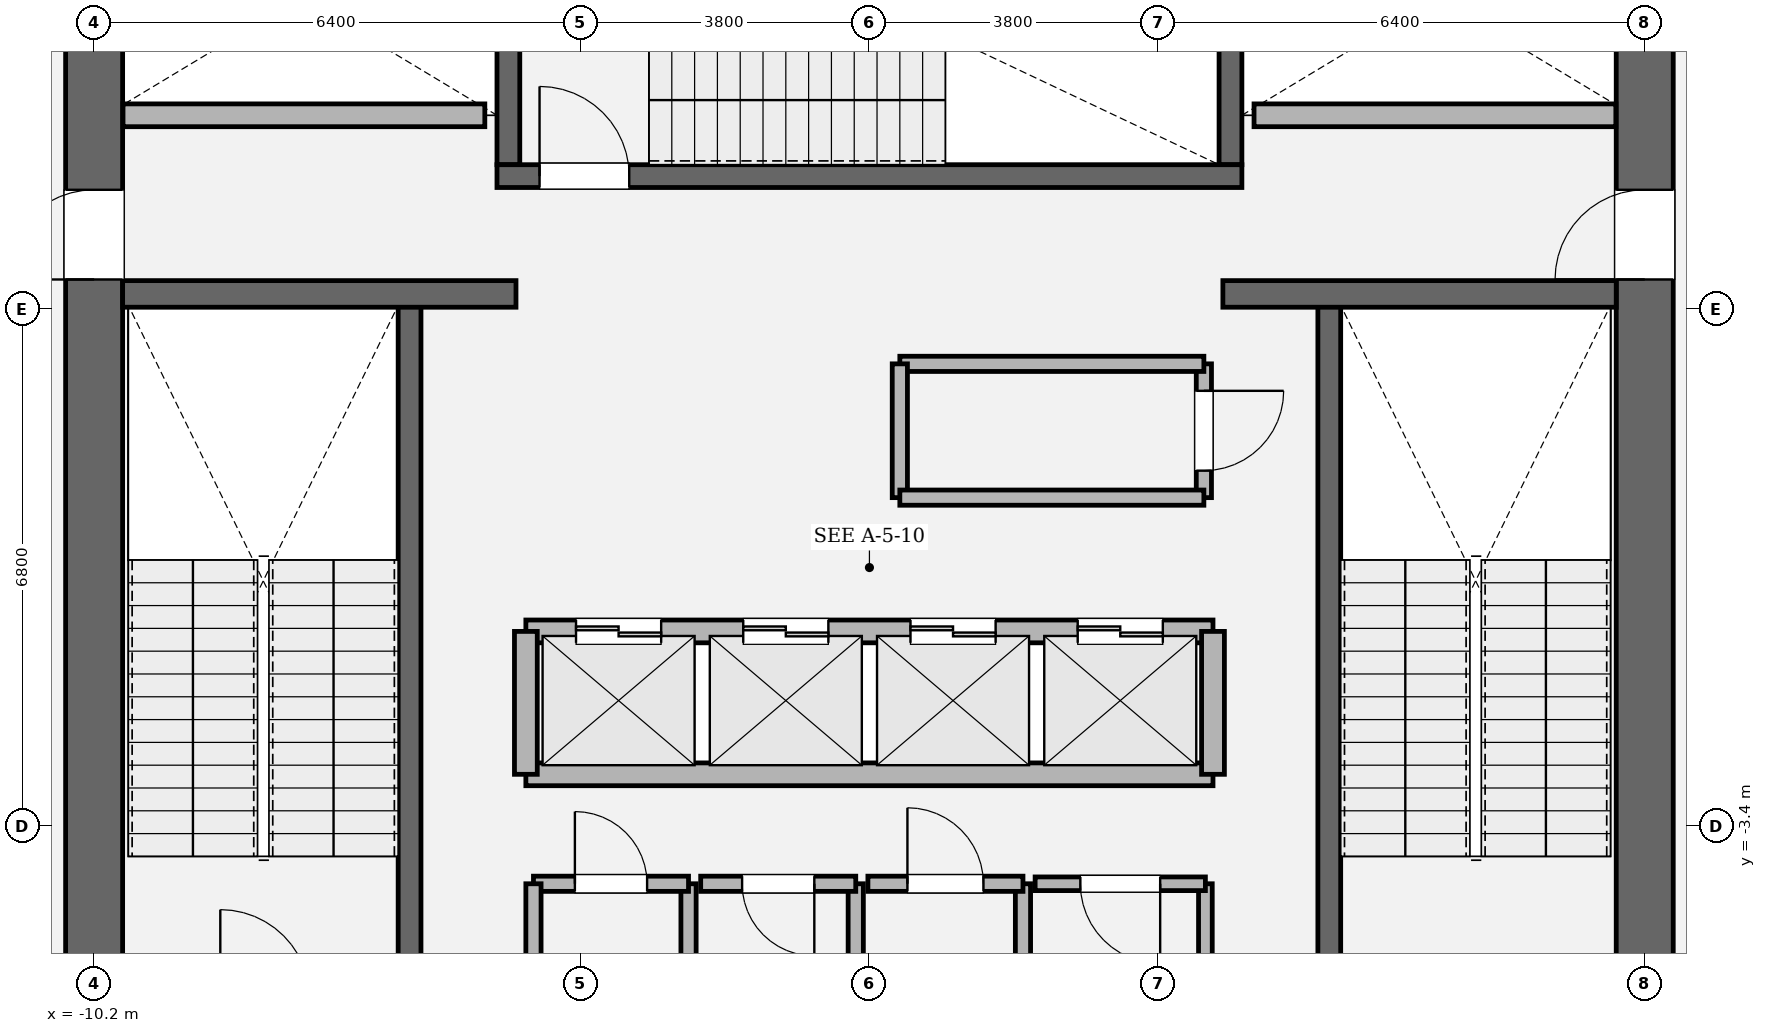
"""IFC4 building model, lengths in metres.
Left out: names, types, materials, properties, quantities, classifications, styles, units other than length and angle.
Written with IfcOpenShell. Run it as: python <this file> out.ifc"""

import sys

from ifc_helpers import new_model, si_unit, direction, frame, frame_2d, origin, place, context, subcontext, project, spatial, rectangle, extrude, element, fill, save


model = new_model("IFC4")
c1 = context("Model", 3, precision=1e-05, world=origin(), true_north=direction((0.0, 1.0)))
c2 = subcontext(c1, "Body", "Model", "MODEL_VIEW")
j1 = project(units=[si_unit("LENGTHUNIT", "METRE"), si_unit("PLANEANGLEUNIT", "RADIAN")], contexts=[c1])
p1 = place(None, origin())
s1 = spatial("IfcSite", under=j1, at=p1, CompositionType="ELEMENT")
p2 = place(p1, origin())
s2 = spatial("IfcBuilding", under=s1, at=p2, CompositionType="ELEMENT")
p3 = place(p2, frame((0.0, 0.0, 44.4)))
s3 = spatial("IfcBuildingStorey", under=s2, at=p3, CompositionType="ELEMENT", Elevation=44.4)
p4 = place(p3, frame((-10.2, -8.825, 0.0), z_axis=(0.0, 0.0, 1.0), x_axis=(0.0, 1.0, 0.0)))
e1 = element("IfcWall", 1, at=p4, inside=s3, PredefinedType="SHEAR", context=c2, shape_type="SweptSolid", body=[
    extrude(rectangle(XDim=17.65, YDim=0.75, at=frame_2d((8.825, 0.0))), origin(), (0.0, 0.0, 1.0), 4.05),
])
p5 = place(p4, frame((12.615, 0.0, 0.0)))
e2 = element("IfcOpeningElement", 2, at=p5, cuts=e1, PredefinedType="OPENING", context=c2, shape_type="SweptSolid", body=[
    extrude(rectangle(XDim=1.18, YDim=2.2, at=frame_2d((0.59, 1.1))), frame((0.0, 0.385, 0.0), z_axis=(0.0, -1.0, 0.0), x_axis=(1.0, 0.0, 0.0)), (0.0, 0.0, 1.0), 0.77),
])
p6 = place(p3, frame((10.2, 8.825, 0.0), z_axis=(0.0, 0.0, 1.0), x_axis=(0.0, -1.0, 0.0)))
e3 = element("IfcWall", 3, at=p6, inside=s3, PredefinedType="SHEAR", context=c2, shape_type="SweptSolid", body=[
    extrude(rectangle(XDim=17.65, YDim=0.75, at=frame_2d((8.825, 0.0))), origin(), (0.0, 0.0, 1.0), 4.05),
])
p7 = place(p6, frame((3.855, 0.0, 0.0)))
e4 = element("IfcOpeningElement", 4, at=p7, cuts=e3, PredefinedType="OPENING", context=c2, shape_type="SweptSolid", body=[
    extrude(rectangle(XDim=1.18, YDim=2.2, at=frame_2d((0.59, 1.1))), frame((0.0, 0.385, 0.0), z_axis=(0.0, -1.0, 0.0), x_axis=(1.0, 0.0, 0.0)), (0.0, 0.0, 1.0), 0.77),
])
for number, where, z_axis, x_axis in (
    (5, (-6.05, -5.5, 0.0), (0.0, 0.0, 1.0), (0.0, 1.0, 0.0)),
    (6, (6.05, 3.45, 0.0), (0.0, 0.0, 1.0), (0.0, -1.0, 0.0)),
):
    element("IfcWall", number, at=place(p3, frame(where, z_axis=z_axis, x_axis=x_axis)), inside=s3, PredefinedType="SOLIDWALL", context=c2, shape_type="SweptSolid", body=[
        extrude(rectangle(XDim=8.95, YDim=0.3, at=frame_2d((4.475, 0.0))), origin(), (0.0, 0.0, 1.0), 4.05),
    ])
for number, where, z_axis, x_axis in (
    (7, (-4.75, 5.3, 0.0), (0.0, 0.0, 1.0), (0.0, 1.0, 0.0)),
    (8, (4.75, 8.825, 0.0), (0.0, 0.0, 1.0), (0.0, -1.0, 0.0)),
):
    element("IfcWall", number, at=place(p3, frame(where, z_axis=z_axis, x_axis=x_axis)), inside=s3, PredefinedType="SOLIDWALL", context=c2, shape_type="SweptSolid", body=[
        extrude(rectangle(XDim=3.525, YDim=0.3, at=frame_2d((1.762, 0.0))), origin(), (0.0, 0.0, 1.0), 4.05),
    ])
p8 = place(p3, frame((-4.9, 5.15, 0.0), z_axis=(0.0, 0.0, 1.0), x_axis=(1.0, 0.0, 0.0)))
e9 = element("IfcWall", 9, at=p8, inside=s3, PredefinedType="SOLIDWALL", context=c2, shape_type="SweptSolid", body=[
    extrude(rectangle(XDim=9.8, YDim=0.3, at=frame_2d((4.9, 0.0))), origin(), (0.0, 0.0, 1.0), 4.05),
])
p9 = place(p8, frame((0.56, 0.0, 0.0)))
e10 = element("IfcOpeningElement", 10, at=p9, cuts=e9, PredefinedType="OPENING", context=c2, shape_type="SweptSolid", body=[
    extrude(rectangle(XDim=1.18, YDim=2.2, at=frame_2d((0.59, 1.1))), frame((0.0, 0.16, 0.0), z_axis=(0.0, -1.0, 0.0), x_axis=(1.0, 0.0, 0.0)), (0.0, 0.0, 1.0), 0.32),
])
for number, where, z_axis, x_axis in (
    (11, (-9.825, 3.6, 0.0), (0.0, 0.0, 1.0), (1.0, 0.0, 0.0)),
    (12, (4.65, 3.6, 0.0), (0.0, 0.0, 1.0), (1.0, 0.0, 0.0)),
):
    element("IfcWall", number, at=place(p3, frame(where, z_axis=z_axis, x_axis=x_axis)), inside=s3, PredefinedType="SOLIDWALL", context=c2, shape_type="SweptSolid", body=[
        extrude(rectangle(XDim=5.175, YDim=0.35, at=frame_2d((2.587, 0.0))), origin(), (0.0, 0.0, 1.0), 4.05),
    ])
p10 = place(p3, frame((-4.52, -0.84, 0.0), z_axis=(0.0, 0.0, 1.0), x_axis=(1.0, 0.0, 0.0)))
e13 = element("IfcWall", 13, at=p10, inside=s3, PredefinedType="SOLIDWALL", context=c2, shape_type="SweptSolid", body=[
    extrude(rectangle(XDim=9.04, YDim=0.3, at=frame_2d((4.52, 0.0))), origin(), (0.0, 0.0, 1.0), 3.81),
])
p11 = place(p10, frame((0.66, 0.0, 0.0)))
e14 = element("IfcOpeningElement", 14, at=p11, cuts=e13, PredefinedType="OPENING", context=c2, shape_type="SweptSolid", body=[
    extrude(rectangle(XDim=1.12, YDim=2.25, at=frame_2d((0.56, 1.125))), frame((0.0, 0.16, 0.0), z_axis=(0.0, -1.0, 0.0), x_axis=(1.0, 0.0, 0.0)), (0.0, 0.0, 1.0), 0.32),
])
p12 = place(p10, frame((2.86, 0.0, 0.0)))
e15 = element("IfcOpeningElement", 15, at=p12, cuts=e13, PredefinedType="OPENING", context=c2, shape_type="SweptSolid", body=[
    extrude(rectangle(XDim=1.12, YDim=2.25, at=frame_2d((0.56, 1.125))), frame((0.0, 0.16, 0.0), z_axis=(0.0, -1.0, 0.0), x_axis=(1.0, 0.0, 0.0)), (0.0, 0.0, 1.0), 0.32),
])
p13 = place(p10, frame((5.06, 0.0, 0.0)))
e16 = element("IfcOpeningElement", 16, at=p13, cuts=e13, PredefinedType="OPENING", context=c2, shape_type="SweptSolid", body=[
    extrude(rectangle(XDim=1.12, YDim=2.25, at=frame_2d((0.56, 1.125))), frame((0.0, 0.16, 0.0), z_axis=(0.0, -1.0, 0.0), x_axis=(1.0, 0.0, 0.0)), (0.0, 0.0, 1.0), 0.32),
])
p14 = place(p10, frame((7.26, 0.0, 0.0)))
e17 = element("IfcOpeningElement", 17, at=p14, cuts=e13, PredefinedType="OPENING", context=c2, shape_type="SweptSolid", body=[
    extrude(rectangle(XDim=1.12, YDim=2.25, at=frame_2d((0.56, 1.125))), frame((0.0, 0.16, 0.0), z_axis=(0.0, -1.0, 0.0), x_axis=(1.0, 0.0, 0.0)), (0.0, 0.0, 1.0), 0.32),
])
p15 = place(p3, frame((-4.52, -2.72, 0.0), z_axis=(0.0, 0.0, 1.0), x_axis=(1.0, 0.0, 0.0)))
e18 = element("IfcWall", 18, at=p15, inside=s3, PredefinedType="SOLIDWALL", context=c2, shape_type="SweptSolid", body=[
    extrude(rectangle(XDim=9.04, YDim=0.3, at=frame_2d((4.52, 0.0))), origin(), (0.0, 0.0, 1.0), 3.81),
])
for number, where, z_axis, x_axis in (
    (19, (-4.52, -2.72, 0.0), (0.0, 0.0, 1.0), (0.0, 1.0, 0.0)),
    (20, (4.52, -2.72, 0.0), (0.0, 0.0, 1.0), (0.0, 1.0, 0.0)),
):
    element("IfcWall", number, at=place(p3, frame(where, z_axis=z_axis, x_axis=x_axis)), inside=s3, PredefinedType="SOLIDWALL", context=c2, shape_type="SweptSolid", body=[
        extrude(rectangle(XDim=1.88, YDim=0.3, at=frame_2d((0.94, 0.0))), origin(), (0.0, 0.0, 1.0), 3.81),
    ])
for number, where, z_axis, x_axis in (
    (21, (-9.82, 5.95, 0.0), (0.0, 0.0, 1.0), (1.0, 0.0, 0.0)),
    (22, (5.06, 5.95, 0.0), (0.0, 0.0, 1.0), (1.0, 0.0, 0.0)),
):
    element("IfcWall", number, at=place(p3, frame(where, z_axis=z_axis, x_axis=x_axis)), inside=s3, PredefinedType="SOLIDWALL", context=c2, shape_type="SweptSolid", body=[
        extrude(rectangle(XDim=4.76, YDim=0.3, at=frame_2d((2.38, 0.0))), origin(), (0.0, 0.0, 1.0), 3.81),
    ])
p16 = place(p3, frame((-2.38, -5.9, 0.0), z_axis=(0.0, 0.0, 1.0), x_axis=(0.0, 1.0, 0.0)))
e23 = element("IfcWall", 23, at=p16, inside=s3, PredefinedType="SOLIDWALL", context=c2, shape_type="SweptSolid", body=[
    extrude(rectangle(XDim=1.74, YDim=0.2, at=frame_2d((0.87, 0.0))), origin(), (0.0, 0.0, 1.0), 3.81),
])
p17 = place(p3, frame((-2.38, -4.16, 0.0), z_axis=(0.0, 0.0, 1.0), x_axis=(-1.0, 0.0, 0.0)))
e24 = element("IfcWall", 24, at=p17, inside=s3, PredefinedType="SOLIDWALL", context=c2, shape_type="SweptSolid", body=[
    extrude(rectangle(XDim=2.04, YDim=0.2, at=frame_2d((1.02, 0.0))), origin(), (0.0, 0.0, 1.0), 3.81),
])
p18 = place(p17, frame((0.545, 0.0, 0.0)))
e25 = element("IfcOpeningElement", 25, at=p18, cuts=e24, PredefinedType="OPENING", context=c2, shape_type="SweptSolid", body=[
    extrude(rectangle(XDim=0.95, YDim=2.15, at=frame_2d((0.475, 1.075))), frame((0.0, 0.11, 0.0), z_axis=(0.0, -1.0, 0.0), x_axis=(1.0, 0.0, 0.0)), (0.0, 0.0, 1.0), 0.22),
])
for number, where, z_axis, x_axis in (
    (26, (-4.42, -4.16, 0.0), (0.0, 0.0, 1.0), (0.0, -1.0, 0.0)),
    (27, (-0.18, -5.9, 0.0), (0.0, 0.0, 1.0), (0.0, 1.0, 0.0)),
):
    element("IfcWall", number, at=place(p3, frame(where, z_axis=z_axis, x_axis=x_axis)), inside=s3, PredefinedType="SOLIDWALL", context=c2, shape_type="SweptSolid", body=[
        extrude(rectangle(XDim=1.74, YDim=0.2, at=frame_2d((0.87, 0.0))), origin(), (0.0, 0.0, 1.0), 3.81),
    ])
p19 = place(p3, frame((-0.18, -4.16, 0.0), z_axis=(0.0, 0.0, 1.0), x_axis=(-1.0, 0.0, 0.0)))
e28 = element("IfcWall", 28, at=p19, inside=s3, PredefinedType="SOLIDWALL", context=c2, shape_type="SweptSolid", body=[
    extrude(rectangle(XDim=2.04, YDim=0.2, at=frame_2d((1.02, 0.0))), origin(), (0.0, 0.0, 1.0), 3.81),
])
p20 = place(p19, frame((0.545, 0.0, 0.0)))
e29 = element("IfcOpeningElement", 29, at=p20, cuts=e28, PredefinedType="OPENING", context=c2, shape_type="SweptSolid", body=[
    extrude(rectangle(XDim=0.95, YDim=2.15, at=frame_2d((0.475, 1.075))), frame((0.0, 0.11, 0.0), z_axis=(0.0, -1.0, 0.0), x_axis=(1.0, 0.0, 0.0)), (0.0, 0.0, 1.0), 0.22),
])
p21 = place(p3, frame((2.02, -5.9, 0.0), z_axis=(0.0, 0.0, 1.0), x_axis=(0.0, 1.0, 0.0)))
e30 = element("IfcWall", 30, at=p21, inside=s3, PredefinedType="SOLIDWALL", context=c2, shape_type="SweptSolid", body=[
    extrude(rectangle(XDim=1.74, YDim=0.2, at=frame_2d((0.87, 0.0))), origin(), (0.0, 0.0, 1.0), 3.81),
])
p22 = place(p3, frame((2.02, -4.16, 0.0), z_axis=(0.0, 0.0, 1.0), x_axis=(-1.0, 0.0, 0.0)))
e31 = element("IfcWall", 31, at=p22, inside=s3, PredefinedType="SOLIDWALL", context=c2, shape_type="SweptSolid", body=[
    extrude(rectangle(XDim=2.04, YDim=0.2, at=frame_2d((1.02, 0.0))), origin(), (0.0, 0.0, 1.0), 3.81),
])
p23 = place(p22, frame((0.52, 0.0, 0.0)))
e32 = element("IfcOpeningElement", 32, at=p23, cuts=e31, PredefinedType="OPENING", context=c2, shape_type="SweptSolid", body=[
    extrude(rectangle(XDim=1.0, YDim=2.15, at=frame_2d((0.5, 1.075))), frame((0.0, 0.11, 0.0), z_axis=(0.0, -1.0, 0.0), x_axis=(1.0, 0.0, 0.0)), (0.0, 0.0, 1.0), 0.22),
])
p24 = place(p3, frame((4.42, -5.9, 0.0), z_axis=(0.0, 0.0, 1.0), x_axis=(0.0, 1.0, 0.0)))
e33 = element("IfcWall", 33, at=p24, inside=s3, PredefinedType="PARTITIONING", context=c2, shape_type="SweptSolid", body=[
    extrude(rectangle(XDim=1.74, YDim=0.18, at=frame_2d((0.87, 0.0))), origin(), (0.0, 0.0, 1.0), 3.81),
])
p25 = place(p3, frame((4.42, -4.16, 0.0), z_axis=(0.0, 0.0, 1.0), x_axis=(-1.0, 0.0, 0.0)))
e34 = element("IfcWall", 34, at=p25, inside=s3, PredefinedType="PARTITIONING", context=c2, shape_type="SweptSolid", body=[
    extrude(rectangle(XDim=2.24, YDim=0.18, at=frame_2d((1.12, 0.0))), origin(), (0.0, 0.0, 1.0), 3.81),
])
p26 = place(p25, frame((0.595, 0.0, 0.0)))
e35 = element("IfcOpeningElement", 35, at=p26, cuts=e34, PredefinedType="OPENING", context=c2, shape_type="SweptSolid", body=[
    extrude(rectangle(XDim=1.05, YDim=2.2, at=frame_2d((0.525, 1.1))), frame((0.0, 0.1, 0.0), z_axis=(0.0, -1.0, 0.0), x_axis=(1.0, 0.0, 0.0)), (0.0, 0.0, 1.0), 0.2),
])
p27 = place(p3, frame((4.4, 0.92, 0.0), z_axis=(0.0, 0.0, 1.0), x_axis=(0.0, 1.0, 0.0)))
e36 = element("IfcWall", 36, at=p27, inside=s3, PredefinedType="SOLIDWALL", context=c2, shape_type="SweptSolid", body=[
    extrude(rectangle(XDim=1.76, YDim=0.2, at=frame_2d((0.88, 0.0))), origin(), (0.0, 0.0, 1.0), 3.81),
])
p28 = place(p27, frame((0.355, 0.0, 0.0)))
e37 = element("IfcOpeningElement", 37, at=p28, cuts=e36, PredefinedType="OPENING", context=c2, shape_type="SweptSolid", body=[
    extrude(rectangle(XDim=1.05, YDim=2.2, at=frame_2d((0.525, 1.1))), frame((0.0, 0.11, 0.0), z_axis=(0.0, -1.0, 0.0), x_axis=(1.0, 0.0, 0.0)), (0.0, 0.0, 1.0), 0.22),
])
p29 = place(p3, frame((4.4, 2.68, 0.0), z_axis=(0.0, 0.0, 1.0), x_axis=(-1.0, 0.0, 0.0)))
e38 = element("IfcWall", 38, at=p29, inside=s3, PredefinedType="SOLIDWALL", context=c2, shape_type="SweptSolid", body=[
    extrude(rectangle(XDim=4.0, YDim=0.2, at=frame_2d((2.0, 0.0))), origin(), (0.0, 0.0, 1.0), 3.81),
])
p30 = place(p3, frame((0.4, 2.68, 0.0), z_axis=(0.0, 0.0, 1.0), x_axis=(0.0, -1.0, 0.0)))
e39 = element("IfcWall", 39, at=p30, inside=s3, PredefinedType="SOLIDWALL", context=c2, shape_type="SweptSolid", body=[
    extrude(rectangle(XDim=1.76, YDim=0.2, at=frame_2d((0.88, 0.0))), origin(), (0.0, 0.0, 1.0), 3.81),
])
p31 = place(p3, frame((0.4, 0.92, 0.0), z_axis=(0.0, 0.0, 1.0), x_axis=(1.0, 0.0, 0.0)))
e40 = element("IfcWall", 40, at=p31, inside=s3, PredefinedType="SOLIDWALL", context=c2, shape_type="SweptSolid", body=[
    extrude(rectangle(XDim=4.0, YDim=0.2, at=frame_2d((2.0, 0.0))), origin(), (0.0, 0.0, 1.0), 3.81),
])
p32 = place(p9, origin())
e41 = element("IfcDoor", 41, at=p32, inside=s3, OperationType="SINGLE_SWING_LEFT", PredefinedType="DOOR", context=c2, shape_type="SweptSolid", body=[
    extrude(rectangle(XDim=1.18, YDim=2.2, at=frame_2d((0.59, 1.1))), frame((0.0, 0.025, 0.0), z_axis=(0.0, -1.0, 0.0), x_axis=(1.0, 0.0, 0.0)), (0.0, 0.0, 1.0), 0.05),
])
fill(e10, e41)
p33 = place(p5, origin())
e42 = element("IfcDoor", 42, at=p33, inside=s3, OperationType="SINGLE_SWING_LEFT", PredefinedType="DOOR", context=c2, shape_type="SweptSolid", body=[
    extrude(rectangle(XDim=1.18, YDim=2.2, at=frame_2d((0.59, 1.1))), frame((0.0, 0.025, 0.0), z_axis=(0.0, -1.0, 0.0), x_axis=(1.0, 0.0, 0.0)), (0.0, 0.0, 1.0), 0.05),
])
fill(e2, e42)
p34 = place(p7, origin())
e43 = element("IfcDoor", 43, at=p34, inside=s3, OperationType="SINGLE_SWING_RIGHT", PredefinedType="DOOR", context=c2, shape_type="SweptSolid", body=[
    extrude(rectangle(XDim=1.18, YDim=2.2, at=frame_2d((0.59, 1.1))), frame((0.0, 0.025, 0.0), z_axis=(0.0, -1.0, 0.0), x_axis=(1.0, 0.0, 0.0)), (0.0, 0.0, 1.0), 0.05),
])
fill(e4, e43)
p35 = place(p11, origin())
e44 = element("IfcDoor", 44, at=p35, inside=s3, OperationType="DOUBLE_DOOR_SLIDING", PredefinedType="DOOR", context=c2, shape_type="SweptSolid", body=[
    extrude(rectangle(XDim=1.12, YDim=2.25, at=frame_2d((0.56, 1.125))), frame((0.0, 0.025, 0.0), z_axis=(0.0, -1.0, 0.0), x_axis=(1.0, 0.0, 0.0)), (0.0, 0.0, 1.0), 0.05),
])
fill(e14, e44)
p36 = place(p12, origin())
e45 = element("IfcDoor", 45, at=p36, inside=s3, OperationType="DOUBLE_DOOR_SLIDING", PredefinedType="DOOR", context=c2, shape_type="SweptSolid", body=[
    extrude(rectangle(XDim=1.12, YDim=2.25, at=frame_2d((0.56, 1.125))), frame((0.0, 0.025, 0.0), z_axis=(0.0, -1.0, 0.0), x_axis=(1.0, 0.0, 0.0)), (0.0, 0.0, 1.0), 0.05),
])
fill(e15, e45)
p37 = place(p13, origin())
e46 = element("IfcDoor", 46, at=p37, inside=s3, OperationType="DOUBLE_DOOR_SLIDING", PredefinedType="DOOR", context=c2, shape_type="SweptSolid", body=[
    extrude(rectangle(XDim=1.12, YDim=2.25, at=frame_2d((0.56, 1.125))), frame((0.0, 0.025, 0.0), z_axis=(0.0, -1.0, 0.0), x_axis=(1.0, 0.0, 0.0)), (0.0, 0.0, 1.0), 0.05),
])
fill(e16, e46)
p38 = place(p14, origin())
e47 = element("IfcDoor", 47, at=p38, inside=s3, OperationType="DOUBLE_DOOR_SLIDING", PredefinedType="DOOR", context=c2, shape_type="SweptSolid", body=[
    extrude(rectangle(XDim=1.12, YDim=2.25, at=frame_2d((0.56, 1.125))), frame((0.0, 0.025, 0.0), z_axis=(0.0, -1.0, 0.0), x_axis=(1.0, 0.0, 0.0)), (0.0, 0.0, 1.0), 0.05),
])
fill(e17, e47)
p39 = place(p18, origin())
e48 = element("IfcDoor", 48, at=p39, inside=s3, OperationType="SINGLE_SWING_RIGHT", PredefinedType="DOOR", context=c2, shape_type="SweptSolid", body=[
    extrude(rectangle(XDim=0.95, YDim=2.15, at=frame_2d((0.475, 1.075))), frame((0.0, 0.025, 0.0), z_axis=(0.0, -1.0, 0.0), x_axis=(1.0, 0.0, 0.0)), (0.0, 0.0, 1.0), 0.05),
])
fill(e25, e48)
p40 = place(p20, origin())
e49 = element("IfcDoor", 49, at=p40, inside=s3, OperationType="SINGLE_SWING_LEFT", PredefinedType="DOOR", context=c2, shape_type="SweptSolid", body=[
    extrude(rectangle(XDim=0.95, YDim=2.15, at=frame_2d((0.475, 1.075))), frame((0.0, 0.025, 0.0), z_axis=(0.0, -1.0, 0.0), x_axis=(1.0, 0.0, 0.0)), (0.0, 0.0, 1.0), 0.05),
])
fill(e29, e49)
p41 = place(p23, origin())
e50 = element("IfcDoor", 50, at=p41, inside=s3, OperationType="SINGLE_SWING_RIGHT", PredefinedType="DOOR", context=c2, shape_type="SweptSolid", body=[
    extrude(rectangle(XDim=1.0, YDim=2.15, at=frame_2d((0.5, 1.075))), frame((0.0, 0.025, 0.0), z_axis=(0.0, -1.0, 0.0), x_axis=(1.0, 0.0, 0.0)), (0.0, 0.0, 1.0), 0.05),
])
fill(e32, e50)
p42 = place(p26, origin())
e51 = element("IfcDoor", 51, at=p42, inside=s3, OperationType="SINGLE_SWING_LEFT", PredefinedType="DOOR", context=c2, shape_type="SweptSolid", body=[
    extrude(rectangle(XDim=1.05, YDim=2.2, at=frame_2d((0.525, 1.1))), frame((0.0, 0.025, 0.0), z_axis=(0.0, -1.0, 0.0), x_axis=(1.0, 0.0, 0.0)), (0.0, 0.0, 1.0), 0.05),
])
fill(e35, e51)
p43 = place(p28, origin())
e52 = element("IfcDoor", 52, at=p43, inside=s3, OperationType="SINGLE_SWING_RIGHT", PredefinedType="DOOR", context=c2, shape_type="SweptSolid", body=[
    extrude(rectangle(XDim=1.05, YDim=2.2, at=frame_2d((0.525, 1.1))), frame((0.0, 0.025, 0.0), z_axis=(0.0, -1.0, 0.0), x_axis=(1.0, 0.0, 0.0)), (0.0, 0.0, 1.0), 0.05),
])
fill(e37, e52)
save(model, sys.argv[1])
